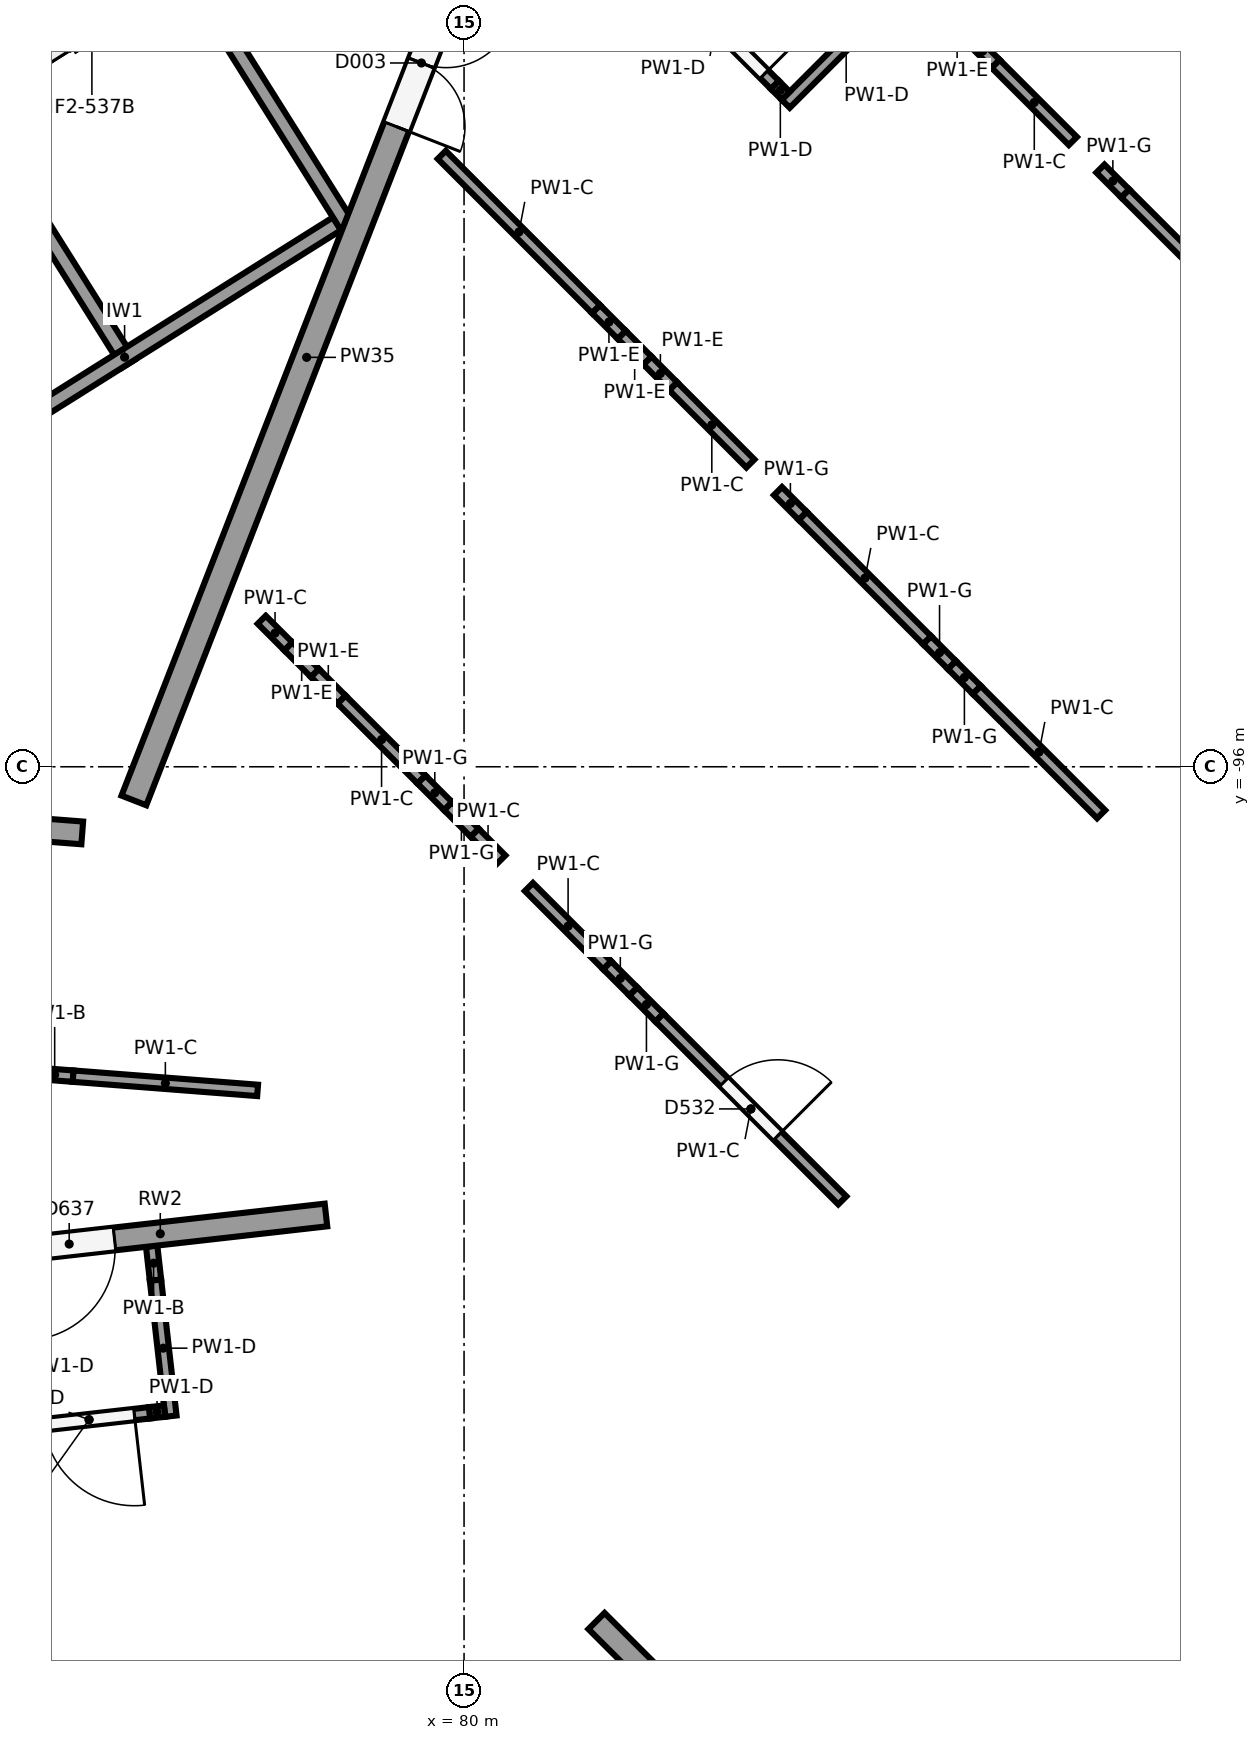
"""IFC4 building model, lengths in metres.
Left out: names, types, materials, properties, quantities, classifications, styles, units other than length and angle.
Written with IfcOpenShell. Run it as: python <this file> out.ifc"""

import sys

from ifc_helpers import new_model, si_unit, direction, frame, frame_2d, origin, origin_2d, place, context, subcontext, project, spatial, rectangle, circle, extrude, element, fill, save


model = new_model("IFC4")
c1 = context("Model", 3, precision=1e-05, world=origin(), true_north=direction((0.0, 1.0)))
c2 = subcontext(c1, "Body", "Model", "MODEL_VIEW")
j1 = project(units=[si_unit("LENGTHUNIT", "METRE"), si_unit("PLANEANGLEUNIT", "RADIAN")], contexts=[c1])
p1 = place(None, origin())
s1 = spatial("IfcSite", under=j1, at=p1, CompositionType="ELEMENT")
p2 = place(p1, origin())
s2 = spatial("IfcBuilding", under=s1, at=p2, CompositionType="ELEMENT")
p3 = place(p2, origin())
s3 = spatial("IfcBuildingStorey", under=s2, at=p3, CompositionType="ELEMENT", Elevation=0.0)
p4 = place(p3, frame((75.475, -96.908, 0.0), z_axis=(0.0, 0.0, 1.0), x_axis=(1.0, 0.0, 0.0)))
e1 = element("IfcColumn", 1, at=p4, inside=s3, PredefinedType="COLUMN", context=c2, shape_type="SweptSolid", body=[
    extrude(circle(Radius=0.5, at=origin_2d()), origin(), (0.0, 0.0, 1.0), 6.5),
])
for number, where, z_axis, x_axis in (
    (2, (77.187, -99.634, -0.3), (0.0, 0.0, 1.0), (1.0, 0.0, 0.0)),
    (3, (78.581, -101.852, -0.3), (0.0, 0.0, 1.0), (1.0, 0.0, 0.0)),
    (4, (81.454, -106.424, -0.3), (0.0, 0.0, 1.0), (1.0, 0.0, 0.0)),
):
    element("IfcColumn", number, at=place(p3, frame(where, z_axis=z_axis, x_axis=x_axis)), inside=s3, PredefinedType="COLUMN", context=c2, shape_type="SweptSolid", body=[
        extrude(circle(Radius=0.4, at=origin_2d()), origin(), (0.0, 0.0, 1.0), 6.8),
    ])
p5 = place(p3, frame((78.183, -101.897, 0.0), z_axis=(0.0, 0.0, 1.0), x_axis=(-0.993657074804, -0.112452735367, 0.0)))
e5 = element("IfcWall", 5, at=p5, inside=s3, PredefinedType="SOLIDWALL", context=c2, shape_type="SweptSolid", body=[
    extrude(rectangle(XDim=4.388, YDim=0.3, at=frame_2d((2.194, 0.0))), origin(), (0.0, 0.0, 1.0), 4.85),
])
p6 = place(p5, frame((2.8, 0.0, 0.0)))
e6 = element("IfcOpeningElement", 6, at=p6, cuts=e5, PredefinedType="OPENING", context=c2, shape_type="SweptSolid", body=[
    extrude(rectangle(XDim=1.2, YDim=2.1, at=frame_2d((0.6, 1.05))), frame((0.0, 0.16, 0.0), z_axis=(0.0, -1.0, 0.0), x_axis=(1.0, 0.0, 0.0)), (0.0, 0.0, 1.0), 0.32),
])
for number, where, z_axis, x_axis in (
    (7, (77.742, -94.909, -0.3), (0.0, 0.0, 1.0), (1.0, 0.0, 0.0)),
    (8, (84.325, -88.325, -0.3), (0.0, 0.0, 1.0), (1.0, 0.0, 0.0)),
    (9, (79.509, -97.101, -0.3), (0.0, 0.0, 1.0), (1.0, 0.0, 0.0)),
    (10, (82.907, -93.703, -0.3), (0.0, 0.0, 1.0), (1.0, 0.0, 0.0)),
    (11, (86.305, -90.305, -0.3), (0.0, 0.0, 1.0), (1.0, 0.0, 0.0)),
    (12, (89.703, -86.907, -0.3), (0.0, 0.0, 1.0), (1.0, 0.0, 0.0)),
    (13, (81.201, -99.793, -0.3), (0.0, 0.0, 1.0), (1.0, 0.0, 0.0)),
    (14, (84.849, -96.145, -0.3), (0.0, 0.0, 1.0), (1.0, 0.0, 0.0)),
    (15, (88.497, -92.497, -0.3), (0.0, 0.0, 1.0), (1.0, 0.0, 0.0)),
    (16, (83.83, -104.942, -0.3), (0.0, 0.0, 1.0), (1.0, 0.0, 0.0)),
    (17, (88.108, -100.664, -0.3), (0.0, 0.0, 1.0), (1.0, 0.0, 0.0)),
):
    element("IfcColumn", number, at=place(p3, frame(where, z_axis=z_axis, x_axis=x_axis)), inside=s3, PredefinedType="COLUMN", context=c2, shape_type="SweptSolid", body=[
        extrude(circle(Radius=0.3, at=origin_2d()), origin(), (0.0, 0.0, 1.0), 6.8),
    ])
p7 = place(p3, frame((95.462, -102.078, 0.0), z_axis=(0.0, 0.0, 1.0), x_axis=(-0.707106781187, -0.707106781187, 0.0)))
e18 = element("IfcWall", 18, at=p7, inside=s3, PredefinedType="SOLIDWALL", context=c2, shape_type="SweptSolid", body=[
    extrude(rectangle(XDim=8.4, YDim=0.3, at=frame_2d((4.2, 0.0))), origin(), (0.0, 0.0, 1.0), 5.05),
])
p8 = place(p7, frame((0.6, 0.0, 0.0)))
e19 = element("IfcOpeningElement", 19, at=p8, cuts=e18, PredefinedType="OPENING", context=c2, shape_type="SweptSolid", body=[
    extrude(rectangle(XDim=7.2, YDim=3.4, at=frame_2d((3.6, 1.7))), frame((0.0, 0.16, 0.0), z_axis=(0.0, -1.0, 0.0), x_axis=(1.0, 0.0, 0.0)), (0.0, 0.0, 1.0), 0.32),
])
p9 = place(p3, frame((86.376, -111.872, 0.0), z_axis=(0.0, 0.0, 1.0), x_axis=(-0.707106781187, 0.707106781187, 0.0)))
e20 = element("IfcWall", 20, at=p9, inside=s3, PredefinedType="SOLIDWALL", context=c2, shape_type="SweptSolid", body=[
    extrude(rectangle(XDim=6.552, YDim=0.3, at=frame_2d((3.276, 0.0))), origin(), (0.0, 0.0, 1.0), 6.15),
])
p10 = place(p3, frame((74.977, -96.87, 0.0), z_axis=(0.0, 0.0, 1.0), x_axis=(-0.997035289114, 0.076945644854, 0.0)))
e21 = element("IfcWall", 21, at=p10, inside=s3, PredefinedType="SOLIDWALL", context=c2, shape_type="SweptSolid", body=[
    extrude(rectangle(XDim=12.514, YDim=0.3, at=frame_2d((6.257, 0.0))), origin(), (0.0, 0.0, 1.0), 4.85),
])
p11 = place(p3, frame((80.202, -84.784, 0.0), z_axis=(0.0, 0.0, 1.0), x_axis=(-0.363293457312, -0.931674762927, 0.0)))
e22 = element("IfcWall", 22, at=p11, inside=s3, PredefinedType="SOLIDWALL", context=c2, shape_type="SweptSolid", body=[
    extrude(rectangle(XDim=12.514, YDim=0.35, at=frame_2d((6.257, 0.0))), origin(), (0.0, 0.0, 1.0), 4.85),
])
p12 = place(p11, frame((1.2, 0.0, 0.0)))
e23 = element("IfcOpeningElement", 23, at=p12, cuts=e22, PredefinedType="OPENING", context=c2, shape_type="SweptSolid", body=[
    extrude(rectangle(XDim=1.8, YDim=2.1, at=frame_2d((0.9, 1.05))), frame((0.0, 0.185, 0.0), z_axis=(0.0, -1.0, 0.0), x_axis=(1.0, 0.0, 0.0)), (0.0, 0.0, 1.0), 0.37),
])
p13 = place(p3, frame((78.466, -88.888, 0.0), z_axis=(0.0, 0.0, 1.0), x_axis=(-0.532032334759, 0.846724036963, 0.0)))
e24 = element("IfcWall", 24, at=p13, inside=s3, PredefinedType="SHEAR", context=c2, shape_type="SweptSolid", body=[
    extrude(rectangle(XDim=8.8, YDim=0.2, at=frame_2d((4.4, 0.0))), origin(), (0.0, 0.0, 1.0), 6.15),
])
p14 = place(p3, frame((72.74, -92.368, 0.0), z_axis=(0.0, 0.0, 1.0), x_axis=(0.846719870989, 0.532038964807, 0.0)))
e25 = element("IfcWall", 25, at=p14, inside=s3, PredefinedType="SHEAR", context=c2, shape_type="SweptSolid", body=[
    extrude(rectangle(XDim=6.6, YDim=0.2, at=frame_2d((3.3, 0.0))), origin(), (0.0, 0.0, 1.0), 6.15),
])
p15 = place(p3, frame((75.587, -90.697, 0.0), z_axis=(0.0, 0.0, 1.0), x_axis=(-0.532044832901, 0.846716183726, 0.0)))
e26 = element("IfcWall", 26, at=p15, inside=s3, PredefinedType="SHEAR", context=c2, shape_type="SweptSolid", body=[
    extrude(rectangle(XDim=8.8, YDim=0.2, at=frame_2d((4.4, 0.0))), origin(), (0.0, 0.0, 1.0), 6.15),
])
p16 = place(p3, frame((77.338, -94.066, 0.0), z_axis=(0.0, 0.0, 1.0), x_axis=(0.707106781187, -0.707106781187, 0.0)))
e27 = element("IfcWall", 27, at=p16, inside=s3, PredefinedType="PARTITIONING", context=c2, shape_type="SweptSolid", body=[
    extrude(rectangle(XDim=0.495, YDim=0.15, at=frame_2d((0.248, 0.0))), origin(), (0.0, 0.0, 1.0), 6.05),
])
for number, where, z_axis, x_axis in (
    (28, (77.688, -94.417, 0.0), (0.0, 0.0, 1.0), (0.707, -0.707, 0.0)),
    (29, (78.039, -94.767, 0.0), (0.0, 0.0, 1.0), (0.707, -0.707, 0.0)),
):
    element("IfcWall", number, at=place(p3, frame(where, z_axis=z_axis, x_axis=x_axis)), inside=s3, PredefinedType="PARTITIONING", context=c2, shape_type="SweptSolid", body=[
        extrude(rectangle(XDim=0.495, YDim=0.15, at=frame_2d((0.248, 0.0))), origin(), (0.0, 0.0, 1.0), 5.25),
    ])
p17 = place(p3, frame((78.389, -95.117, 0.0), z_axis=(0.0, 0.0, 1.0), x_axis=(0.707024640654, -0.707188912178, 0.0)))
e30 = element("IfcWall", 30, at=p17, inside=s3, PredefinedType="PARTITIONING", context=c2, shape_type="SweptSolid", body=[
    extrude(rectangle(XDim=1.486, YDim=0.15, at=frame_2d((0.743, 0.0))), origin(), (0.0, 0.0, 1.0), 6.05),
])
for number, where, z_axis, x_axis in (
    (31, (79.44, -96.168, 0.0), (0.0, 0.0, 1.0), (0.707, -0.707, 0.0)),
    (32, (79.79, -96.518, 0.0), (0.0, 0.0, 1.0), (0.707, -0.707, 0.0)),
):
    element("IfcWall", number, at=place(p3, frame(where, z_axis=z_axis, x_axis=x_axis)), inside=s3, PredefinedType="PARTITIONING", context=c2, shape_type="SweptSolid", body=[
        extrude(rectangle(XDim=0.495, YDim=0.15, at=frame_2d((0.248, 0.0))), origin(), (0.0, 0.0, 1.0), 5.4),
    ])
p18 = place(p3, frame((80.141, -96.868, 0.0), z_axis=(0.0, 0.0, 1.0), x_axis=(0.706860445455, -0.707353031131, 0.0)))
e33 = element("IfcWall", 33, at=p18, inside=s3, PredefinedType="PARTITIONING", context=c2, shape_type="SweptSolid", body=[
    extrude(rectangle(XDim=0.496, YDim=0.15, at=frame_2d((0.248, 0.0))), origin(), (0.0, 0.0, 1.0), 6.05),
])
p19 = place(p3, frame((80.854, -97.582, 0.0), z_axis=(0.0, 0.0, 1.0), x_axis=(0.707106781187, -0.707106781187, 0.0)))
e34 = element("IfcWall", 34, at=p19, inside=s3, PredefinedType="PARTITIONING", context=c2, shape_type="SweptSolid", body=[
    extrude(rectangle(XDim=1.458, YDim=0.15, at=frame_2d((0.729, 0.0))), origin(), (0.0, 0.0, 1.0), 6.05),
])
for number, where, z_axis, x_axis in (
    (35, (81.884, -98.612, 0.0), (0.0, 0.0, 1.0), (0.707, -0.707, 0.0)),
    (36, (82.228, -98.956, 0.0), (0.0, 0.0, 1.0), (0.707, -0.707, 0.0)),
):
    element("IfcWall", number, at=place(p3, frame(where, z_axis=z_axis, x_axis=x_axis)), inside=s3, PredefinedType="PARTITIONING", context=c2, shape_type="SweptSolid", body=[
        extrude(rectangle(XDim=0.486, YDim=0.15, at=frame_2d((0.243, 0.0))), origin(), (0.0, 0.0, 1.0), 5.4),
    ])
p20 = place(p3, frame((82.571, -99.299, 0.0), z_axis=(0.0, 0.0, 1.0), x_axis=(0.707142668556, -0.707070891996, 0.0)))
e37 = element("IfcWall", 37, at=p20, inside=s3, PredefinedType="PARTITIONING", context=c2, shape_type="SweptSolid", body=[
    extrude(rectangle(XDim=3.401, YDim=0.15, at=frame_2d((1.701, 0.0))), origin(), (0.0, 0.0, 1.0), 6.05),
])
p21 = place(p20, frame((1.2, 0.0, 0.0)))
e38 = element("IfcOpeningElement", 38, at=p21, cuts=e37, PredefinedType="OPENING", context=c2, shape_type="SweptSolid", body=[
    extrude(rectangle(XDim=1.0, YDim=2.1, at=frame_2d((0.5, 1.05))), frame((0.0, 0.085, 0.0), z_axis=(0.0, -1.0, 0.0), x_axis=(1.0, 0.0, 0.0)), (0.0, 0.0, 1.0), 0.17),
])
p22 = place(p3, frame((79.707, -87.949, 0.0), z_axis=(0.0, 0.0, 1.0), x_axis=(0.707106781187, -0.707106781187, 0.0)))
e39 = element("IfcWall", 39, at=p22, inside=s3, PredefinedType="PARTITIONING", context=c2, shape_type="SweptSolid", body=[
    extrude(rectangle(XDim=2.872, YDim=0.15, at=frame_2d((1.436, 0.0))), origin(), (0.0, 0.0, 1.0), 6.05),
])
for number, where, z_axis, x_axis in (
    (40, (81.737, -89.98, 0.0), (0.0, 0.0, 1.0), (0.707, -0.707, 0.0)),
    (41, (82.075, -90.318, 0.0), (0.0, 0.0, 1.0), (0.707, -0.707, 0.0)),
    (42, (82.414, -90.656, 0.0), (0.0, 0.0, 1.0), (0.707, -0.707, 0.0)),
):
    element("IfcWall", number, at=place(p3, frame(where, z_axis=z_axis, x_axis=x_axis)), inside=s3, PredefinedType="PARTITIONING", context=c2, shape_type="SweptSolid", body=[
        extrude(rectangle(XDim=0.479, YDim=0.15, at=frame_2d((0.239, 0.0))), origin(), (0.0, 0.0, 1.0), 5.25),
    ])
p23 = place(p3, frame((82.752, -90.995, 0.0), z_axis=(0.0, 0.0, 1.0), x_axis=(0.707106781187, -0.707106781187, 0.0)))
e43 = element("IfcWall", 43, at=p23, inside=s3, PredefinedType="PARTITIONING", context=c2, shape_type="SweptSolid", body=[
    extrude(rectangle(XDim=1.436, YDim=0.15, at=frame_2d((0.718, 0.0))), origin(), (0.0, 0.0, 1.0), 6.05),
])
p24 = place(p3, frame((84.13, -92.373, 0.0), z_axis=(0.0, 0.0, 1.0), x_axis=(0.707370676207, -0.706842787643, 0.0)))
e44 = element("IfcWall", 44, at=p24, inside=s3, PredefinedType="PARTITIONING", context=c2, shape_type="SweptSolid", body=[
    extrude(rectangle(XDim=0.462, YDim=0.15, at=frame_2d((0.231, 0.0))), origin(), (0.0, 0.0, 1.0), 5.4),
])
p25 = place(p3, frame((84.457, -92.7, 0.0), z_axis=(0.0, 0.0, 1.0), x_axis=(0.707053998237, -0.707159560196, 0.0)))
e45 = element("IfcWall", 45, at=p25, inside=s3, PredefinedType="PARTITIONING", context=c2, shape_type="SweptSolid", body=[
    extrude(rectangle(XDim=2.313, YDim=0.15, at=frame_2d((1.156, 0.0))), origin(), (0.0, 0.0, 1.0), 6.05),
])
for number, where, z_axis, x_axis in (
    (46, (86.093, -94.335, 0.0), (0.0, 0.0, 1.0), (0.707, -0.707, 0.0)),
    (47, (86.42, -94.662, 0.0), (0.0, 0.0, 1.0), (0.707, -0.707, 0.0)),
):
    element("IfcWall", number, at=place(p3, frame(where, z_axis=z_axis, x_axis=x_axis)), inside=s3, PredefinedType="PARTITIONING", context=c2, shape_type="SweptSolid", body=[
        extrude(rectangle(XDim=0.462, YDim=0.15, at=frame_2d((0.231, 0.0))), origin(), (0.0, 0.0, 1.0), 5.4),
    ])
p26 = place(p3, frame((86.747, -94.989, 0.0), z_axis=(0.0, 0.0, 1.0), x_axis=(0.707159560196, -0.707053998237, 0.0)))
e48 = element("IfcWall", 48, at=p26, inside=s3, PredefinedType="PARTITIONING", context=c2, shape_type="SweptSolid", body=[
    extrude(rectangle(XDim=2.313, YDim=0.15, at=frame_2d((1.156, 0.0))), origin(), (0.0, 0.0, 1.0), 6.05),
])
p27 = place(p3, frame((86.656, -86.414, 0.0), z_axis=(0.0, 0.0, 1.0), x_axis=(0.707106781187, -0.707106781187, 0.0)))
e49 = element("IfcWall", 49, at=p27, inside=s3, PredefinedType="PARTITIONING", context=c2, shape_type="SweptSolid", body=[
    extrude(rectangle(XDim=0.479, YDim=0.15, at=frame_2d((0.239, 0.0))), origin(), (0.0, 0.0, 1.0), 5.25),
])
p28 = place(p3, frame((86.995, -86.752, 0.0), z_axis=(0.0, 0.0, 1.0), x_axis=(0.707106781187, -0.707106781187, 0.0)))
e50 = element("IfcWall", 50, at=p28, inside=s3, PredefinedType="PARTITIONING", context=c2, shape_type="SweptSolid", body=[
    extrude(rectangle(XDim=1.436, YDim=0.15, at=frame_2d((0.718, 0.0))), origin(), (0.0, 0.0, 1.0), 6.05),
])
p29 = place(p3, frame((88.373, -88.13, 0.0), z_axis=(0.0, 0.0, 1.0), x_axis=(0.706842787643, -0.707370676207, 0.0)))
e51 = element("IfcWall", 51, at=p29, inside=s3, PredefinedType="PARTITIONING", context=c2, shape_type="SweptSolid", body=[
    extrude(rectangle(XDim=0.462, YDim=0.15, at=frame_2d((0.231, 0.0))), origin(), (0.0, 0.0, 1.0), 5.4),
])
p30 = place(p3, frame((88.7, -88.457, 0.0), z_axis=(0.0, 0.0, 1.0), x_axis=(0.707159560196, -0.707053998237, 0.0)))
e52 = element("IfcWall", 52, at=p30, inside=s3, PredefinedType="PARTITIONING", context=c2, shape_type="SweptSolid", body=[
    extrude(rectangle(XDim=2.313, YDim=0.15, at=frame_2d((1.156, 0.0))), origin(), (0.0, 0.0, 1.0), 6.05),
])
p31 = place(p3, frame((74.371, -100.033, 0.0), z_axis=(0.0, 0.0, 1.0), x_axis=(0.997051534558, -0.076734851503, 0.0)))
e53 = element("IfcWall", 53, at=p31, inside=s3, PredefinedType="PARTITIONING", context=c2, shape_type="SweptSolid", body=[
    extrude(rectangle(XDim=0.487, YDim=0.15, at=frame_2d((0.243, 0.0))), origin(), (0.0, 0.0, 1.0), 4.85),
])
p32 = place(p3, frame((74.856, -100.07, 0.0), z_axis=(0.0, 0.0, 1.0), x_axis=(0.99703735319, -0.076918894578, 0.0)))
e54 = element("IfcWall", 54, at=p32, inside=s3, PredefinedType="PARTITIONING", context=c2, shape_type="SweptSolid", body=[
    extrude(rectangle(XDim=2.435, YDim=0.15, at=frame_2d((1.217, 0.0))), origin(), (0.0, 0.0, 1.0), 6.05),
])
p33 = place(p3, frame((85.823, -85.687, 0.0), z_axis=(0.0, 0.0, 1.0), x_axis=(-0.707052524, -0.70716103421, 0.0)))
e55 = element("IfcWall", 55, at=p33, inside=s3, PredefinedType="PARTITIONING", context=c2, shape_type="SweptSolid", body=[
    extrude(rectangle(XDim=2.25, YDim=0.15, at=frame_2d((1.125, 0.0))), origin(), (0.0, 0.0, 1.0), 6.1),
])
p34 = place(p3, frame((82.535, -85.474, 0.0), z_axis=(0.0, 0.0, 1.0), x_axis=(0.707106781187, -0.707106781187, 0.0)))
e56 = element("IfcWall", 56, at=p34, inside=s3, PredefinedType="PARTITIONING", context=c2, shape_type="SweptSolid", body=[
    extrude(rectangle(XDim=2.2, YDim=0.15, at=frame_2d((1.1, 0.0))), origin(), (0.0, 0.0, 1.0), 6.1),
])
p35 = place(p34, frame((0.2, 0.0, 0.0)))
e57 = element("IfcOpeningElement", 57, at=p35, cuts=e56, PredefinedType="OPENING", context=c2, shape_type="SweptSolid", body=[
    extrude(rectangle(XDim=1.8, YDim=2.1, at=frame_2d((0.9, 1.05))), frame((0.0, 0.085, 0.0), z_axis=(0.0, -1.0, 0.0), x_axis=(1.0, 0.0, 0.0)), (0.0, 0.0, 1.0), 0.17),
])
p36 = place(p3, frame((84.091, -87.03, 0.0), z_axis=(0.0, 0.0, 1.0), x_axis=(0.707716618519, -0.706496417452, 0.0)))
e58 = element("IfcWall", 58, at=p36, inside=s3, PredefinedType="PARTITIONING", context=c2, shape_type="SweptSolid", body=[
    extrude(rectangle(XDim=0.2, YDim=0.15, at=frame_2d((0.1, 0.0))), origin(), (0.0, 0.0, 1.0), 6.1),
])
p37 = place(p3, frame((75.89, -102.307, 0.0), z_axis=(0.0, 0.0, 1.0), x_axis=(0.112276818937, -0.993676967595, 0.0)))
e59 = element("IfcWall", 59, at=p37, inside=s3, PredefinedType="PARTITIONING", context=c2, shape_type="SweptSolid", body=[
    extrude(rectangle(XDim=0.45, YDim=0.15, at=frame_2d((0.225, 0.0))), origin(), (0.0, 0.0, 1.0), 4.85),
])
p38 = place(p3, frame((75.94, -102.755, 0.0), z_axis=(0.0, 0.0, 1.0), x_axis=(0.112441006732, -0.99365840207, 0.0)))
e60 = element("IfcWall", 60, at=p38, inside=s3, PredefinedType="PARTITIONING", context=c2, shape_type="SweptSolid", body=[
    extrude(rectangle(XDim=1.8, YDim=0.15, at=frame_2d((0.9, 0.0))), origin(), (0.0, 0.0, 1.0), 6.1),
])
p39 = place(p3, frame((76.06, -104.477, 0.0), z_axis=(0.0, 0.0, 1.0), x_axis=(-0.993673547442, -0.112307083986, 0.0)))
e61 = element("IfcWall", 61, at=p39, inside=s3, PredefinedType="PARTITIONING", context=c2, shape_type="SweptSolid", body=[
    extrude(rectangle(XDim=0.2, YDim=0.15, at=frame_2d((0.1, 0.0))), origin(), (0.0, 0.0, 1.0), 6.1),
])
p40 = place(p3, frame((75.861, -104.5, 0.0), z_axis=(0.0, 0.0, 1.0), x_axis=(-0.993656507662, -0.112457746644, 0.0)))
e62 = element("IfcWall", 62, at=p40, inside=s3, PredefinedType="PARTITIONING", context=c2, shape_type="SweptSolid", body=[
    extrude(rectangle(XDim=1.6, YDim=0.15, at=frame_2d((0.8, 0.0))), origin(), (0.0, 0.0, 1.0), 6.1),
])
p41 = place(p40, frame((0.2, 0.0, 0.0)))
e63 = element("IfcOpeningElement", 63, at=p41, cuts=e62, PredefinedType="OPENING", context=c2, shape_type="SweptSolid", body=[
    extrude(rectangle(XDim=1.2, YDim=2.1, at=frame_2d((0.6, 1.05))), frame((0.0, 0.085, 0.0), z_axis=(0.0, -1.0, 0.0), x_axis=(1.0, 0.0, 0.0)), (0.0, 0.0, 1.0), 0.17),
])
p42 = place(p21, origin())
e64 = element("IfcDoor", 64, at=p42, inside=s3, OperationType="SINGLE_SWING_RIGHT", PredefinedType="DOOR", context=c2, shape_type="SweptSolid", body=[
    extrude(rectangle(XDim=1.0, YDim=2.1, at=frame_2d((0.5, 1.05))), frame((0.0, 0.025, 0.0), z_axis=(0.0, -1.0, 0.0), x_axis=(1.0, 0.0, 0.0)), (0.0, 0.0, 1.0), 0.05),
])
fill(e38, e64)
p43 = place(p6, origin())
e65 = element("IfcDoor", 65, at=p43, inside=s3, OperationType="SINGLE_SWING_RIGHT", PredefinedType="DOOR", context=c2, shape_type="SweptSolid", body=[
    extrude(rectangle(XDim=1.2, YDim=2.1, at=frame_2d((0.6, 1.05))), frame((0.0, 0.025, 0.0), z_axis=(0.0, -1.0, 0.0), x_axis=(1.0, 0.0, 0.0)), (0.0, 0.0, 1.0), 0.05),
])
fill(e6, e65)
p44 = place(p35, origin())
e66 = element("IfcDoor", 66, at=p44, inside=s3, OperationType="DOUBLE_DOOR_SINGLE_SWING", PredefinedType="DOOR", context=c2, shape_type="SweptSolid", body=[
    extrude(rectangle(XDim=1.8, YDim=2.1, at=frame_2d((0.9, 1.05))), frame((0.0, 0.025, 0.0), z_axis=(0.0, -1.0, 0.0), x_axis=(1.0, 0.0, 0.0)), (0.0, 0.0, 1.0), 0.05),
])
fill(e57, e66)
p45 = place(p41, origin())
e67 = element("IfcDoor", 67, at=p45, inside=s3, OperationType="SINGLE_SWING_LEFT", PredefinedType="DOOR", context=c2, shape_type="SweptSolid", body=[
    extrude(rectangle(XDim=1.2, YDim=2.1, at=frame_2d((0.6, 1.05))), frame((0.0, 0.025, 0.0), z_axis=(0.0, -1.0, 0.0), x_axis=(1.0, 0.0, 0.0)), (0.0, 0.0, 1.0), 0.05),
])
fill(e63, e67)
p46 = place(p12, origin())
e68 = element("IfcDoor", 68, at=p46, inside=s3, OperationType="DOUBLE_DOOR_SINGLE_SWING", PredefinedType="DOOR", context=c2, shape_type="SweptSolid", body=[
    extrude(rectangle(XDim=1.8, YDim=2.1, at=frame_2d((0.9, 1.05))), frame((0.0, 0.025, 0.0), z_axis=(0.0, -1.0, 0.0), x_axis=(1.0, 0.0, 0.0)), (0.0, 0.0, 1.0), 0.05),
])
fill(e23, e68)
save(model, sys.argv[1])
